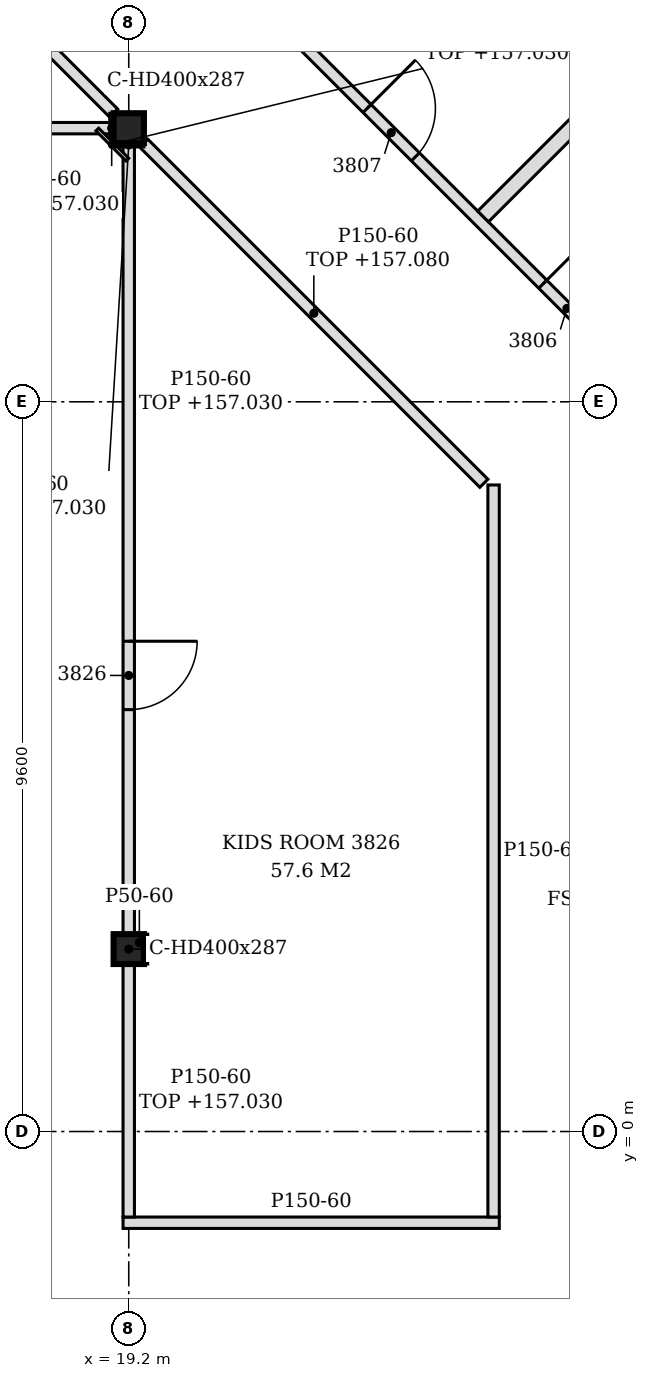
"""IFC4 building model, lengths in metres.
Left out: names, types, materials, properties, quantities, classifications, styles, units other than length and angle.
Written with IfcOpenShell. Run it as: python <this file> out.ifc"""

import sys

from ifc_helpers import new_model, si_unit, direction, frame, frame_2d, origin, origin_2d, place, context, subcontext, project, spatial, polyline, rectangle, i_section, outline, extrude, element, fill, save


model = new_model("IFC4")
c1 = context("Model", 3, precision=1e-05, world=origin(), true_north=direction((0.0, 1.0)))
c2 = subcontext(c1, "Body", "Model", "MODEL_VIEW")
j1 = project(units=[si_unit("LENGTHUNIT", "METRE"), si_unit("PLANEANGLEUNIT", "RADIAN")], contexts=[c1])
p1 = place(None, origin())
s1 = spatial("IfcSite", under=j1, at=p1, CompositionType="ELEMENT")
p2 = place(p1, origin())
s2 = spatial("IfcBuilding", under=s1, at=p2, CompositionType="ELEMENT")
p3 = place(p2, frame((0.0, 0.0, 154.2)))
s3 = spatial("IfcBuildingStorey", under=s2, at=p3, CompositionType="ELEMENT", Elevation=154.2)
for number, where, z_axis, x_axis in (
    (1, (19.2, 2.4, -0.15), (0.0, 0.0, 1.0), (1.0, 0.0, 0.0)),
    (2, (19.2, 13.2, -0.15), (0.0, 0.0, 1.0), (1.0, 0.0, 0.0)),
):
    element("IfcColumn", number, at=place(p3, frame(where, z_axis=z_axis, x_axis=x_axis)), inside=s3, PredefinedType="COLUMN", context=c2, shape_type="SweptSolid", body=[
        extrude(i_section(OverallWidth=0.399, OverallDepth=0.393, WebThickness=0.023, FlangeThickness=0.037, FilletRadius=0.015, at=origin_2d()), origin(), (0.0, 0.0, 1.0), 3.6),
    ])
p4 = place(p3, frame((19.125, -1.2, 0.0), z_axis=(0.0, 0.0, 1.0), x_axis=(1.0, 0.0, 0.0)))
e3 = element("IfcWall", 3, at=p4, inside=s3, PredefinedType="PARTITIONING", context=c2, shape_type="SweptSolid", body=[
    extrude(outline(polyline([(0.0, 0.0), (4.95, 0.0), (4.95, 3.45), (0.225, 3.45), (0.223, 2.83), (0.0, 2.83), (0.0, 0.0)])), frame((0.0, 0.075, 0.0), z_axis=(0.0, -1.0, 0.0), x_axis=(1.0, 0.0, 0.0)), (0.0, 0.0, 1.0), 0.15),
])
p5 = place(p3, frame((19.2, -1.125, 0.0), z_axis=(0.0, 0.0, 1.0), x_axis=(0.0, 1.0, 0.0)))
e4 = element("IfcWall", 4, at=p5, inside=s3, PredefinedType="PARTITIONING", context=c2, shape_type="SweptSolid", body=[
    extrude(rectangle(XDim=3.329, YDim=0.15, at=frame_2d((1.664, 0.0))), origin(), (0.0, 0.0, 1.0), 2.83),
])
p6 = place(p3, frame((24.0, -1.125, 0.0), z_axis=(0.0, 0.0, 1.0), x_axis=(0.0, 1.0, 0.0)))
e5 = element("IfcWall", 5, at=p6, inside=s3, PredefinedType="PARTITIONING", context=c2, shape_type="SweptSolid", body=[
    extrude(outline(polyline([(0.0, 0.0), (9.631, 0.0), (9.631, 3.45), (6.03, 3.45), (6.028, 2.88), (5.82, 2.88), (5.818, 3.45), (1.23, 3.45), (1.228, 2.88), (1.02, 2.88), (1.018, 3.45), (0.0, 3.45), (0.0, 0.0)])), frame((0.0, 0.075, 0.0), z_axis=(0.0, -1.0, 0.0), x_axis=(1.0, 0.0, 0.0)), (0.0, 0.0, 1.0), 0.15),
])
p7 = place(p3, frame((19.2, 2.596, 0.0), z_axis=(0.0, 0.0, 1.0), x_axis=(0.0, 1.0, 0.0)))
e6 = element("IfcWall", 6, at=p7, inside=s3, PredefinedType="PARTITIONING", context=c2, shape_type="SweptSolid", body=[
    extrude(rectangle(XDim=10.407, YDim=0.15, at=frame_2d((5.204, 0.0))), origin(), (0.0, 0.0, 1.0), 2.83),
])
p8 = place(p7, frame((2.954, 0.0, 0.0)))
e7 = element("IfcOpeningElement", 7, at=p8, cuts=e6, PredefinedType="OPENING", context=c2, shape_type="SweptSolid", body=[
    extrude(rectangle(XDim=0.9, YDim=2.1, at=frame_2d((0.45, 1.05))), frame((0.0, 0.085, 0.0), z_axis=(0.0, -1.0, 0.0), x_axis=(1.0, 0.0, 0.0)), (0.0, 0.0, 1.0), 0.17),
])
p9 = place(p3, frame((23.872, 8.528, 0.0), z_axis=(0.0, 0.0, 1.0), x_axis=(-0.707126073897, 0.70708748795, 0.0)))
e8 = element("IfcWall", 8, at=p9, inside=s3, PredefinedType="PARTITIONING", context=c2, shape_type="SweptSolid", body=[
    extrude(rectangle(XDim=6.327, YDim=0.15, at=frame_2d((3.164, 0.0))), origin(), (0.0, 0.0, 1.0), 2.88),
])
p10 = place(p3, frame((26.272, 9.522, 0.0), z_axis=(0.0, 0.0, 1.0), x_axis=(-0.707097742657, 0.707115819601, 0.0)))
e9 = element("IfcWall", 9, at=p10, inside=s3, PredefinedType="PARTITIONING", context=c2, shape_type="SweptSolid", body=[
    extrude(rectangle(XDim=13.506, YDim=0.15, at=frame_2d((6.753, 0.0))), origin(), (0.0, 0.0, 1.0), 2.73),
])
p11 = place(p10, frame((1.398, 0.0, 0.0)))
e10 = element("IfcOpeningElement", 10, at=p11, cuts=e9, PredefinedType="OPENING", context=c2, shape_type="SweptSolid", body=[
    extrude(rectangle(XDim=0.9, YDim=2.1, at=frame_2d((0.45, 1.05))), frame((0.0, 0.085, 0.0), z_axis=(0.0, -1.0, 0.0), x_axis=(1.0, 0.0, 0.0)), (0.0, 0.0, 1.0), 0.17),
])
p12 = place(p10, frame((4.668, 0.0, 0.0)))
e11 = element("IfcOpeningElement", 11, at=p12, cuts=e9, PredefinedType="OPENING", context=c2, shape_type="SweptSolid", body=[
    extrude(rectangle(XDim=0.9, YDim=2.1, at=frame_2d((0.45, 1.05))), frame((0.0, 0.085, 0.0), z_axis=(0.0, -1.0, 0.0), x_axis=(1.0, 0.0, 0.0)), (0.0, 0.0, 1.0), 0.17),
])
p13 = place(p10, frame((7.938, 0.0, 0.0)))
e12 = element("IfcOpeningElement", 12, at=p13, cuts=e9, PredefinedType="OPENING", context=c2, shape_type="SweptSolid", body=[
    extrude(rectangle(XDim=0.9, YDim=2.1, at=frame_2d((0.45, 1.05))), frame((0.0, 0.085, 0.0), z_axis=(0.0, -1.0, 0.0), x_axis=(1.0, 0.0, 0.0)), (0.0, 0.0, 1.0), 0.17),
])
p14 = place(p10, frame((11.405, 0.0, 0.0)))
e13 = element("IfcOpeningElement", 13, at=p14, cuts=e9, PredefinedType="OPENING", context=c2, shape_type="SweptSolid", body=[
    extrude(rectangle(XDim=0.9, YDim=2.1, at=frame_2d((0.45, 1.05))), frame((0.0, 0.085, 0.0), z_axis=(0.0, -1.0, 0.0), x_axis=(1.0, 0.0, 0.0)), (0.0, 0.0, 1.0), 0.17),
])
p15 = place(p3, frame((23.862, 12.038, 0.0), z_axis=(0.0, 0.0, 1.0), x_axis=(0.707106781187, 0.707106781187, 0.0)))
e14 = element("IfcWall", 14, at=p15, inside=s3, PredefinedType="PARTITIONING", context=c2, shape_type="SweptSolid", body=[
    extrude(rectangle(XDim=8.929, YDim=0.2, at=frame_2d((4.464, 0.0))), origin(), (0.0, 0.0, 1.0), 2.88),
])
p16 = place(p3, frame((7.399, 13.2, 0.0), z_axis=(0.0, 0.0, 1.0), x_axis=(1.0, 0.0, 0.0)))
e15 = element("IfcWall", 15, at=p16, inside=s3, PredefinedType="PARTITIONING", context=c2, shape_type="SweptSolid", body=[
    extrude(rectangle(XDim=11.601, YDim=0.15, at=frame_2d((5.801, 0.0))), origin(), (0.0, 0.0, 1.0), 2.83),
])
p17 = place(p16, frame((0.551, 0.0, 0.0)))
e16 = element("IfcOpeningElement", 16, at=p17, cuts=e15, PredefinedType="OPENING", context=c2, shape_type="SweptSolid", body=[
    extrude(rectangle(XDim=0.9, YDim=2.1, at=frame_2d((0.45, 1.05))), frame((0.0, 0.085, 0.0), z_axis=(0.0, -1.0, 0.0), x_axis=(1.0, 0.0, 0.0)), (0.0, 0.0, 1.0), 0.17),
])
p18 = place(p3, frame((19.002, 13.398, 0.0), z_axis=(0.0, 0.0, 1.0), x_axis=(-0.707106781187, 0.707106781187, 0.0)))
e17 = element("IfcWall", 17, at=p18, inside=s3, PredefinedType="PARTITIONING", context=c2, shape_type="SweptSolid", body=[
    extrude(rectangle(XDim=4.595, YDim=0.15, at=frame_2d((2.297, 0.0))), origin(), (0.0, 0.0, 1.0), 3.45),
])
p19 = place(p3, frame((19.425, 2.204, 0.0), z_axis=(0.0, 0.0, 1.0), x_axis=(0.0, 1.0, 0.0)))
e18 = element("IfcWall", 18, at=p19, inside=s3, PredefinedType="PARTITIONING", context=c2, shape_type="SweptSolid", body=[
    extrude(rectangle(XDim=0.393, YDim=0.05, at=frame_2d((0.196, 0.0))), origin(), (0.0, 0.0, 1.0), 3.45),
])
p20 = place(p3, frame((18.976, 13.003, 0.0), z_axis=(0.0, 0.0, 1.0), x_axis=(0.0, 1.0, 0.0)))
e19 = element("IfcWall", 19, at=p20, inside=s3, PredefinedType="PARTITIONING", context=c2, shape_type="SweptSolid", body=[
    extrude(rectangle(XDim=0.393, YDim=0.05, at=frame_2d((0.197, 0.0))), origin(), (0.0, 0.0, 1.0), 2.83),
])
p21 = place(p3, frame((19.182, 12.786, 0.0), z_axis=(0.0, 0.0, 1.0), x_axis=(-0.707106781187, 0.707106781187, 0.0)))
e20 = element("IfcWall", 20, at=p21, inside=s3, PredefinedType="PARTITIONING", context=c2, shape_type="SweptSolid", body=[
    extrude(rectangle(XDim=0.56, YDim=0.05, at=frame_2d((0.28, 0.0))), origin(), (0.0, 0.0, 1.0), 2.83),
])
p22 = place(p3, frame((19.0, 12.979, 0.0), z_axis=(0.0, 0.0, 1.0), x_axis=(1.0, 0.0, 0.0)))
e21 = element("IfcWall", 21, at=p22, inside=s3, PredefinedType="PARTITIONING", context=c2, shape_type="SweptSolid", body=[
    extrude(rectangle(XDim=0.399, YDim=0.05, at=frame_2d((0.199, 0.0))), origin(), (0.0, 0.0, 1.0), 2.83),
])
p23 = place(p11, frame((0.9, 0.0, 0.0), z_axis=(0.0, 0.0, 1.0), x_axis=(-1.0, 0.0, 0.0)))
e22 = element("IfcDoor", 22, at=p23, inside=s3, OperationType="SINGLE_SWING_LEFT", PredefinedType="DOOR", context=c2, shape_type="SweptSolid", body=[
    extrude(rectangle(XDim=0.9, YDim=2.1, at=frame_2d((0.45, 1.05))), frame((0.0, 0.025, 0.0), z_axis=(0.0, -1.0, 0.0), x_axis=(1.0, 0.0, 0.0)), (0.0, 0.0, 1.0), 0.05),
])
fill(e10, e22)
p24 = place(p12, frame((0.9, 0.0, 0.0), z_axis=(0.0, 0.0, 1.0), x_axis=(-1.0, 0.0, 0.0)))
e23 = element("IfcDoor", 23, at=p24, inside=s3, OperationType="SINGLE_SWING_LEFT", PredefinedType="DOOR", context=c2, shape_type="SweptSolid", body=[
    extrude(rectangle(XDim=0.9, YDim=2.1, at=frame_2d((0.45, 1.05))), frame((0.0, 0.025, 0.0), z_axis=(0.0, -1.0, 0.0), x_axis=(1.0, 0.0, 0.0)), (0.0, 0.0, 1.0), 0.05),
])
fill(e11, e23)
p25 = place(p8, frame((0.9, 0.0, 0.0), z_axis=(0.0, 0.0, 1.0), x_axis=(-1.0, 0.0, 0.0)))
e24 = element("IfcDoor", 24, at=p25, inside=s3, OperationType="SINGLE_SWING_LEFT", PredefinedType="DOOR", context=c2, shape_type="SweptSolid", body=[
    extrude(rectangle(XDim=0.9, YDim=2.1, at=frame_2d((0.45, 1.05))), frame((0.0, 0.025, 0.0), z_axis=(0.0, -1.0, 0.0), x_axis=(1.0, 0.0, 0.0)), (0.0, 0.0, 1.0), 0.05),
])
fill(e7, e24)
save(model, sys.argv[1])
